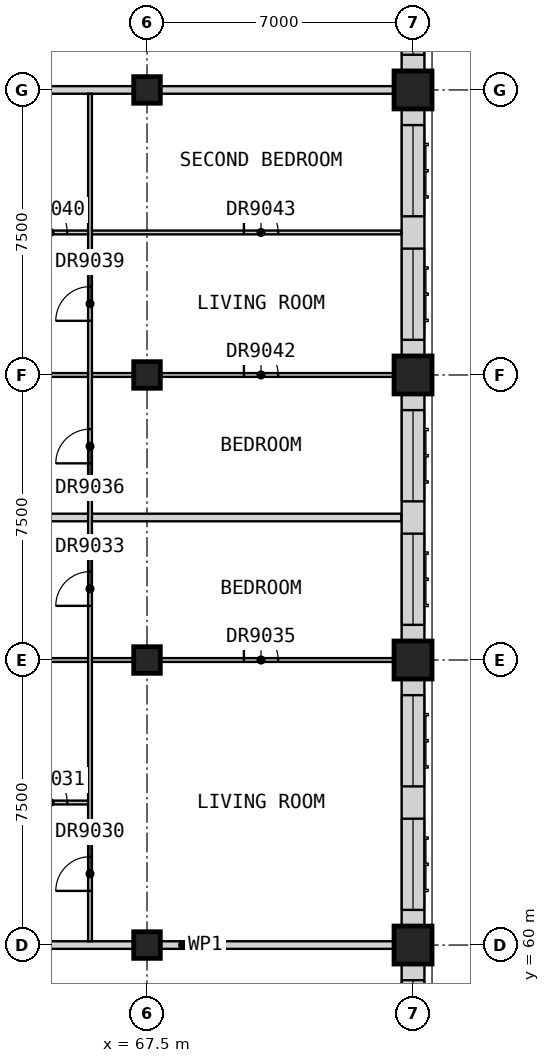
"""IFC4 building model, lengths in metres.
Left out: names, types, materials, properties, quantities, classifications, styles, units other than length and angle.
Written with IfcOpenShell. Run it as: python <this file> out.ifc"""

import sys

from ifc_helpers import new_model, si_unit, direction, frame, frame_2d, origin, origin_2d, place, context, subcontext, project, spatial, rectangle, extrude, element, fill, save


model = new_model("IFC4")
c1 = context("Model", 3, precision=1e-05, world=origin(), true_north=direction((0.0, 1.0)))
c2 = subcontext(c1, "Body", "Model", "MODEL_VIEW")
j1 = project(units=[si_unit("LENGTHUNIT", "METRE"), si_unit("PLANEANGLEUNIT", "RADIAN")], contexts=[c1])
p1 = place(None, origin())
s1 = spatial("IfcSite", under=j1, at=p1, CompositionType="ELEMENT")
p2 = place(p1, origin())
s2 = spatial("IfcBuilding", under=s1, at=p2, CompositionType="ELEMENT")
p3 = place(p2, frame((0.0, 0.0, 269.7)))
s3 = spatial("IfcBuildingStorey", under=s2, at=p3, CompositionType="ELEMENT", Elevation=269.7)
for number, where, z_axis, x_axis in (
    (1, (67.5, 60.0, 0.0), (0.0, 0.0, 1.0), (1.0, 0.0, 0.0)),
    (2, (67.5, 67.5, 0.0), (0.0, 0.0, 1.0), (1.0, 0.0, 0.0)),
    (3, (67.5, 75.0, 0.0), (0.0, 0.0, 1.0), (1.0, 0.0, 0.0)),
    (4, (67.5, 82.5, 0.0), (0.0, 0.0, 1.0), (1.0, 0.0, 0.0)),
):
    element("IfcColumn", number, at=place(p3, frame(where, z_axis=z_axis, x_axis=x_axis)), inside=s3, PredefinedType="COLUMN", context=c2, shape_type="SweptSolid", body=[
        extrude(rectangle(XDim=0.7, YDim=0.7, at=origin_2d()), origin(), (0.0, 0.0, 1.0), 3.5),
    ])
for number, where, z_axis, x_axis in (
    (5, (74.5, 60.0, 0.0), (0.0, 0.0, 1.0), (1.0, 0.0, 0.0)),
    (6, (74.5, 67.5, 0.0), (0.0, 0.0, 1.0), (1.0, 0.0, 0.0)),
    (7, (74.5, 75.0, 0.0), (0.0, 0.0, 1.0), (1.0, 0.0, 0.0)),
    (8, (74.5, 82.5, 0.0), (0.0, 0.0, 1.0), (1.0, 0.0, 0.0)),
):
    element("IfcColumn", number, at=place(p3, frame(where, z_axis=z_axis, x_axis=x_axis)), inside=s3, PredefinedType="COLUMN", context=c2, shape_type="SweptSolid", body=[
        extrude(rectangle(XDim=1.0, YDim=1.0, at=origin_2d()), origin(), (0.0, 0.0, 1.0), 3.5),
    ])
p4 = place(p3, frame((74.5, 53.0, 0.0), z_axis=(0.0, 0.0, 1.0), x_axis=(0.0, 1.0, 0.0)))
e9 = element("IfcWall", 9, at=p4, inside=s3, PredefinedType="SOLIDWALL", context=c2, shape_type="SweptSolid", body=[
    extrude(rectangle(XDim=6.5, YDim=0.6, at=frame_2d((3.25, 0.0))), origin(), (0.0, 0.0, 1.0), 2.75),
])
p5 = place(p4, frame((0.425, 0.0, 0.8)))
e10 = element("IfcOpeningElement", 10, at=p5, cuts=e9, PredefinedType="OPENING", context=c2, shape_type="SweptSolid", body=[
    extrude(rectangle(XDim=2.4, YDim=1.8, at=frame_2d((1.2, 0.9))), frame((0.0, 0.31, 0.0), z_axis=(0.0, -1.0, 0.0), x_axis=(1.0, 0.0, 0.0)), (0.0, 0.0, 1.0), 0.62),
])
p6 = place(p4, frame((3.675, 0.0, 0.8)))
e11 = element("IfcOpeningElement", 11, at=p6, cuts=e9, PredefinedType="OPENING", context=c2, shape_type="SweptSolid", body=[
    extrude(rectangle(XDim=2.4, YDim=1.8, at=frame_2d((1.2, 0.9))), frame((0.0, 0.31, 0.0), z_axis=(0.0, -1.0, 0.0), x_axis=(1.0, 0.0, 0.0)), (0.0, 0.0, 1.0), 0.62),
])
p7 = place(p3, frame((74.5, 60.5, 0.0), z_axis=(0.0, 0.0, 1.0), x_axis=(0.0, 1.0, 0.0)))
e12 = element("IfcWall", 12, at=p7, inside=s3, PredefinedType="SOLIDWALL", context=c2, shape_type="SweptSolid", body=[
    extrude(rectangle(XDim=6.5, YDim=0.6, at=frame_2d((3.25, 0.0))), origin(), (0.0, 0.0, 1.0), 2.75),
])
p8 = place(p7, frame((0.425, 0.0, 0.8)))
e13 = element("IfcOpeningElement", 13, at=p8, cuts=e12, PredefinedType="OPENING", context=c2, shape_type="SweptSolid", body=[
    extrude(rectangle(XDim=2.4, YDim=1.8, at=frame_2d((1.2, 0.9))), frame((0.0, 0.31, 0.0), z_axis=(0.0, -1.0, 0.0), x_axis=(1.0, 0.0, 0.0)), (0.0, 0.0, 1.0), 0.62),
])
p9 = place(p7, frame((3.675, 0.0, 0.8)))
e14 = element("IfcOpeningElement", 14, at=p9, cuts=e12, PredefinedType="OPENING", context=c2, shape_type="SweptSolid", body=[
    extrude(rectangle(XDim=2.4, YDim=1.8, at=frame_2d((1.2, 0.9))), frame((0.0, 0.31, 0.0), z_axis=(0.0, -1.0, 0.0), x_axis=(1.0, 0.0, 0.0)), (0.0, 0.0, 1.0), 0.62),
])
p10 = place(p3, frame((74.5, 68.0, 0.0), z_axis=(0.0, 0.0, 1.0), x_axis=(0.0, 1.0, 0.0)))
e15 = element("IfcWall", 15, at=p10, inside=s3, PredefinedType="SOLIDWALL", context=c2, shape_type="SweptSolid", body=[
    extrude(rectangle(XDim=6.5, YDim=0.6, at=frame_2d((3.25, 0.0))), origin(), (0.0, 0.0, 1.0), 2.75),
])
p11 = place(p10, frame((0.425, 0.0, 0.8)))
e16 = element("IfcOpeningElement", 16, at=p11, cuts=e15, PredefinedType="OPENING", context=c2, shape_type="SweptSolid", body=[
    extrude(rectangle(XDim=2.4, YDim=1.8, at=frame_2d((1.2, 0.9))), frame((0.0, 0.31, 0.0), z_axis=(0.0, -1.0, 0.0), x_axis=(1.0, 0.0, 0.0)), (0.0, 0.0, 1.0), 0.62),
])
p12 = place(p10, frame((3.675, 0.0, 0.8)))
e17 = element("IfcOpeningElement", 17, at=p12, cuts=e15, PredefinedType="OPENING", context=c2, shape_type="SweptSolid", body=[
    extrude(rectangle(XDim=2.4, YDim=1.8, at=frame_2d((1.2, 0.9))), frame((0.0, 0.31, 0.0), z_axis=(0.0, -1.0, 0.0), x_axis=(1.0, 0.0, 0.0)), (0.0, 0.0, 1.0), 0.62),
])
p13 = place(p3, frame((74.5, 75.5, 0.0), z_axis=(0.0, 0.0, 1.0), x_axis=(0.0, 1.0, 0.0)))
e18 = element("IfcWall", 18, at=p13, inside=s3, PredefinedType="SOLIDWALL", context=c2, shape_type="SweptSolid", body=[
    extrude(rectangle(XDim=6.5, YDim=0.6, at=frame_2d((3.25, 0.0))), origin(), (0.0, 0.0, 1.0), 2.75),
])
p14 = place(p13, frame((0.425, 0.0, 0.8)))
e19 = element("IfcOpeningElement", 19, at=p14, cuts=e18, PredefinedType="OPENING", context=c2, shape_type="SweptSolid", body=[
    extrude(rectangle(XDim=2.4, YDim=1.8, at=frame_2d((1.2, 0.9))), frame((0.0, 0.31, 0.0), z_axis=(0.0, -1.0, 0.0), x_axis=(1.0, 0.0, 0.0)), (0.0, 0.0, 1.0), 0.62),
])
p15 = place(p13, frame((3.675, 0.0, 0.8)))
e20 = element("IfcOpeningElement", 20, at=p15, cuts=e18, PredefinedType="OPENING", context=c2, shape_type="SweptSolid", body=[
    extrude(rectangle(XDim=2.4, YDim=1.8, at=frame_2d((1.2, 0.9))), frame((0.0, 0.31, 0.0), z_axis=(0.0, -1.0, 0.0), x_axis=(1.0, 0.0, 0.0)), (0.0, 0.0, 1.0), 0.62),
])
p16 = place(p3, frame((74.5, 83.0, 0.0), z_axis=(0.0, 0.0, 1.0), x_axis=(0.0, 1.0, 0.0)))
e21 = element("IfcWall", 21, at=p16, inside=s3, PredefinedType="SOLIDWALL", context=c2, shape_type="SweptSolid", body=[
    extrude(rectangle(XDim=6.5, YDim=0.6, at=frame_2d((3.25, 0.0))), origin(), (0.0, 0.0, 1.0), 2.75),
])
p17 = place(p16, frame((0.425, 0.0, 0.8)))
e22 = element("IfcOpeningElement", 22, at=p17, cuts=e21, PredefinedType="OPENING", context=c2, shape_type="SweptSolid", body=[
    extrude(rectangle(XDim=2.4, YDim=1.8, at=frame_2d((1.2, 0.9))), frame((0.0, 0.31, 0.0), z_axis=(0.0, -1.0, 0.0), x_axis=(1.0, 0.0, 0.0)), (0.0, 0.0, 1.0), 0.62),
])
p18 = place(p16, frame((3.675, 0.0, 0.8)))
e23 = element("IfcOpeningElement", 23, at=p18, cuts=e21, PredefinedType="OPENING", context=c2, shape_type="SweptSolid", body=[
    extrude(rectangle(XDim=2.4, YDim=1.8, at=frame_2d((1.2, 0.9))), frame((0.0, 0.31, 0.0), z_axis=(0.0, -1.0, 0.0), x_axis=(1.0, 0.0, 0.0)), (0.0, 0.0, 1.0), 0.62),
])
p19 = place(p3, frame((61.875, 60.0, 0.0), z_axis=(0.0, 0.0, 1.0), x_axis=(1.0, 0.0, 0.0)))
e24 = element("IfcWall", 24, at=p19, inside=s3, PredefinedType="PARTITIONING", context=c2, shape_type="SweptSolid", body=[
    extrude(rectangle(XDim=13.125, YDim=0.2, at=frame_2d((6.562, 0.0))), origin(), (0.0, 0.0, 1.0), 3.25),
])
p20 = place(p3, frame((61.875, 71.25, 0.0), z_axis=(0.0, 0.0, 1.0), x_axis=(1.0, 0.0, 0.0)))
e25 = element("IfcWall", 25, at=p20, inside=s3, PredefinedType="PARTITIONING", context=c2, shape_type="SweptSolid", body=[
    extrude(rectangle(XDim=12.315, YDim=0.2, at=frame_2d((6.157, 0.0))), origin(), (0.0, 0.0, 1.0), 3.25),
])
p21 = place(p3, frame((61.875, 82.5, 0.0), z_axis=(0.0, 0.0, 1.0), x_axis=(1.0, 0.0, 0.0)))
e26 = element("IfcWall", 26, at=p21, inside=s3, PredefinedType="PARTITIONING", context=c2, shape_type="SweptSolid", body=[
    extrude(rectangle(XDim=13.125, YDim=0.2, at=frame_2d((6.562, 0.0))), origin(), (0.0, 0.0, 1.0), 3.25),
])
p22 = place(p3, frame((63.962, 63.75, 0.0), z_axis=(0.0, 0.0, 1.0), x_axis=(1.0, 0.0, 0.0)))
e27 = element("IfcWall", 27, at=p22, inside=s3, PredefinedType="PARTITIONING", context=c2, shape_type="SweptSolid", body=[
    extrude(rectangle(XDim=1.988, YDim=0.1, at=frame_2d((0.994, 0.0))), origin(), (0.0, 0.0, 1.0), 3.25),
])
p23 = place(p22, frame((0.538, 0.0, 0.0)))
e28 = element("IfcOpeningElement", 28, at=p23, cuts=e27, PredefinedType="OPENING", context=c2, shape_type="SweptSolid", body=[
    extrude(rectangle(XDim=0.9, YDim=2.1, at=frame_2d((0.45, 1.05))), frame((0.0, 0.06, 0.0), z_axis=(0.0, -1.0, 0.0), x_axis=(1.0, 0.0, 0.0)), (0.0, 0.0, 1.0), 0.12),
])
p24 = place(p3, frame((63.962, 67.5, 0.0), z_axis=(0.0, 0.0, 1.0), x_axis=(1.0, 0.0, 0.0)))
e29 = element("IfcWall", 29, at=p24, inside=s3, PredefinedType="PARTITIONING", context=c2, shape_type="SweptSolid", body=[
    extrude(rectangle(XDim=11.038, YDim=0.1, at=frame_2d((5.519, 0.0))), origin(), (0.0, 0.0, 1.0), 3.25),
])
p25 = place(p24, frame((6.087, 0.0, 0.0)))
e30 = element("IfcOpeningElement", 30, at=p25, cuts=e29, PredefinedType="OPENING", context=c2, shape_type="SweptSolid", body=[
    extrude(rectangle(XDim=0.9, YDim=2.1, at=frame_2d((0.45, 1.05))), frame((0.0, 0.06, 0.0), z_axis=(0.0, -1.0, 0.0), x_axis=(1.0, 0.0, 0.0)), (0.0, 0.0, 1.0), 0.12),
])
p26 = place(p3, frame((63.962, 75.0, 0.0), z_axis=(0.0, 0.0, 1.0), x_axis=(1.0, 0.0, 0.0)))
e31 = element("IfcWall", 31, at=p26, inside=s3, PredefinedType="PARTITIONING", context=c2, shape_type="SweptSolid", body=[
    extrude(rectangle(XDim=11.038, YDim=0.1, at=frame_2d((5.519, 0.0))), origin(), (0.0, 0.0, 1.0), 3.25),
])
p27 = place(p26, frame((6.087, 0.0, 0.0)))
e32 = element("IfcOpeningElement", 32, at=p27, cuts=e31, PredefinedType="OPENING", context=c2, shape_type="SweptSolid", body=[
    extrude(rectangle(XDim=0.9, YDim=2.1, at=frame_2d((0.45, 1.05))), frame((0.0, 0.06, 0.0), z_axis=(0.0, -1.0, 0.0), x_axis=(1.0, 0.0, 0.0)), (0.0, 0.0, 1.0), 0.12),
])
p28 = place(p3, frame((63.962, 78.75, 0.0), z_axis=(0.0, 0.0, 1.0), x_axis=(1.0, 0.0, 0.0)))
e33 = element("IfcWall", 33, at=p28, inside=s3, PredefinedType="PARTITIONING", context=c2, shape_type="SweptSolid", body=[
    extrude(rectangle(XDim=10.228, YDim=0.1, at=frame_2d((5.114, 0.0))), origin(), (0.0, 0.0, 1.0), 3.25),
])
p29 = place(p28, frame((0.538, 0.0, 0.0)))
e34 = element("IfcOpeningElement", 34, at=p29, cuts=e33, PredefinedType="OPENING", context=c2, shape_type="SweptSolid", body=[
    extrude(rectangle(XDim=0.9, YDim=2.1, at=frame_2d((0.45, 1.05))), frame((0.0, 0.06, 0.0), z_axis=(0.0, -1.0, 0.0), x_axis=(1.0, 0.0, 0.0)), (0.0, 0.0, 1.0), 0.12),
])
p30 = place(p28, frame((6.087, 0.0, 0.0)))
e35 = element("IfcOpeningElement", 35, at=p30, cuts=e33, PredefinedType="OPENING", context=c2, shape_type="SweptSolid", body=[
    extrude(rectangle(XDim=0.9, YDim=2.1, at=frame_2d((0.45, 1.05))), frame((0.0, 0.06, 0.0), z_axis=(0.0, -1.0, 0.0), x_axis=(1.0, 0.0, 0.0)), (0.0, 0.0, 1.0), 0.12),
])
p31 = place(p3, frame((66.0, 60.1, 0.0), z_axis=(0.0, 0.0, 1.0), x_axis=(0.0, 1.0, 0.0)))
e36 = element("IfcWall", 36, at=p31, inside=s3, PredefinedType="PARTITIONING", context=c2, shape_type="SweptSolid", body=[
    extrude(rectangle(XDim=22.3, YDim=0.1, at=frame_2d((11.15, 0.0))), origin(), (0.0, 0.0, 1.0), 3.25),
])
p32 = place(p31, frame((1.325, 0.0, 0.0)))
e37 = element("IfcOpeningElement", 37, at=p32, cuts=e36, PredefinedType="OPENING", context=c2, shape_type="SweptSolid", body=[
    extrude(rectangle(XDim=0.9, YDim=2.1, at=frame_2d((0.45, 1.05))), frame((0.0, 0.06, 0.0), z_axis=(0.0, -1.0, 0.0), x_axis=(1.0, 0.0, 0.0)), (0.0, 0.0, 1.0), 0.12),
])
p33 = place(p31, frame((8.825, 0.0, 0.0)))
e38 = element("IfcOpeningElement", 38, at=p33, cuts=e36, PredefinedType="OPENING", context=c2, shape_type="SweptSolid", body=[
    extrude(rectangle(XDim=0.9, YDim=2.1, at=frame_2d((0.45, 1.05))), frame((0.0, 0.06, 0.0), z_axis=(0.0, -1.0, 0.0), x_axis=(1.0, 0.0, 0.0)), (0.0, 0.0, 1.0), 0.12),
])
p34 = place(p31, frame((12.575, 0.0, 0.0)))
e39 = element("IfcOpeningElement", 39, at=p34, cuts=e36, PredefinedType="OPENING", context=c2, shape_type="SweptSolid", body=[
    extrude(rectangle(XDim=0.9, YDim=2.1, at=frame_2d((0.45, 1.05))), frame((0.0, 0.06, 0.0), z_axis=(0.0, -1.0, 0.0), x_axis=(1.0, 0.0, 0.0)), (0.0, 0.0, 1.0), 0.12),
])
p35 = place(p31, frame((16.325, 0.0, 0.0)))
e40 = element("IfcOpeningElement", 40, at=p35, cuts=e36, PredefinedType="OPENING", context=c2, shape_type="SweptSolid", body=[
    extrude(rectangle(XDim=0.9, YDim=2.1, at=frame_2d((0.45, 1.05))), frame((0.0, 0.06, 0.0), z_axis=(0.0, -1.0, 0.0), x_axis=(1.0, 0.0, 0.0)), (0.0, 0.0, 1.0), 0.12),
])
p36 = place(p6, origin())
e41 = element("IfcWindow", 41, at=p36, inside=s3, PartitioningType="SINGLE_PANEL", PredefinedType="WINDOW", context=c2, shape_type="SweptSolid", body=[
    extrude(rectangle(XDim=2.4, YDim=1.8, at=frame_2d((1.2, 0.9))), frame((0.0, -0.07, 0.0), z_axis=(0.0, -1.0, 0.0), x_axis=(1.0, 0.0, 0.0)), (0.0, 0.0, 1.0), 0.06),
])
fill(e11, e41)
p37 = place(p8, origin())
e42 = element("IfcWindow", 42, at=p37, inside=s3, PartitioningType="SINGLE_PANEL", PredefinedType="WINDOW", context=c2, shape_type="SweptSolid", body=[
    extrude(rectangle(XDim=2.4, YDim=1.8, at=frame_2d((1.2, 0.9))), frame((0.0, -0.07, 0.0), z_axis=(0.0, -1.0, 0.0), x_axis=(1.0, 0.0, 0.0)), (0.0, 0.0, 1.0), 0.06),
])
fill(e13, e42)
p38 = place(p9, origin())
e43 = element("IfcWindow", 43, at=p38, inside=s3, PartitioningType="SINGLE_PANEL", PredefinedType="WINDOW", context=c2, shape_type="SweptSolid", body=[
    extrude(rectangle(XDim=2.4, YDim=1.8, at=frame_2d((1.2, 0.9))), frame((0.0, -0.07, 0.0), z_axis=(0.0, -1.0, 0.0), x_axis=(1.0, 0.0, 0.0)), (0.0, 0.0, 1.0), 0.06),
])
fill(e14, e43)
p39 = place(p11, origin())
e44 = element("IfcWindow", 44, at=p39, inside=s3, PartitioningType="SINGLE_PANEL", PredefinedType="WINDOW", context=c2, shape_type="SweptSolid", body=[
    extrude(rectangle(XDim=2.4, YDim=1.8, at=frame_2d((1.2, 0.9))), frame((0.0, -0.07, 0.0), z_axis=(0.0, -1.0, 0.0), x_axis=(1.0, 0.0, 0.0)), (0.0, 0.0, 1.0), 0.06),
])
fill(e16, e44)
p40 = place(p12, origin())
e45 = element("IfcWindow", 45, at=p40, inside=s3, PartitioningType="SINGLE_PANEL", PredefinedType="WINDOW", context=c2, shape_type="SweptSolid", body=[
    extrude(rectangle(XDim=2.4, YDim=1.8, at=frame_2d((1.2, 0.9))), frame((0.0, -0.07, 0.0), z_axis=(0.0, -1.0, 0.0), x_axis=(1.0, 0.0, 0.0)), (0.0, 0.0, 1.0), 0.06),
])
fill(e17, e45)
p41 = place(p14, origin())
e46 = element("IfcWindow", 46, at=p41, inside=s3, PartitioningType="SINGLE_PANEL", PredefinedType="WINDOW", context=c2, shape_type="SweptSolid", body=[
    extrude(rectangle(XDim=2.4, YDim=1.8, at=frame_2d((1.2, 0.9))), frame((0.0, -0.07, 0.0), z_axis=(0.0, -1.0, 0.0), x_axis=(1.0, 0.0, 0.0)), (0.0, 0.0, 1.0), 0.06),
])
fill(e19, e46)
p42 = place(p15, origin())
e47 = element("IfcWindow", 47, at=p42, inside=s3, PartitioningType="SINGLE_PANEL", PredefinedType="WINDOW", context=c2, shape_type="SweptSolid", body=[
    extrude(rectangle(XDim=2.4, YDim=1.8, at=frame_2d((1.2, 0.9))), frame((0.0, -0.07, 0.0), z_axis=(0.0, -1.0, 0.0), x_axis=(1.0, 0.0, 0.0)), (0.0, 0.0, 1.0), 0.06),
])
fill(e20, e47)
p43 = place(p17, origin())
e48 = element("IfcWindow", 48, at=p43, inside=s3, PartitioningType="SINGLE_PANEL", PredefinedType="WINDOW", context=c2, shape_type="SweptSolid", body=[
    extrude(rectangle(XDim=2.4, YDim=1.8, at=frame_2d((1.2, 0.9))), frame((0.0, -0.07, 0.0), z_axis=(0.0, -1.0, 0.0), x_axis=(1.0, 0.0, 0.0)), (0.0, 0.0, 1.0), 0.06),
])
fill(e22, e48)
p44 = place(p32, origin())
e49 = element("IfcDoor", 49, at=p44, inside=s3, OperationType="SINGLE_SWING_LEFT", PredefinedType="DOOR", context=c2, shape_type="SweptSolid", body=[
    extrude(rectangle(XDim=0.9, YDim=2.1, at=frame_2d((0.45, 1.05))), frame((0.0, 0.025, 0.0), z_axis=(0.0, -1.0, 0.0), x_axis=(1.0, 0.0, 0.0)), (0.0, 0.0, 1.0), 0.05),
])
fill(e37, e49)
p45 = place(p23, origin())
e50 = element("IfcDoor", 50, at=p45, inside=s3, OperationType="SINGLE_SWING_RIGHT", PredefinedType="DOOR", context=c2, shape_type="SweptSolid", body=[
    extrude(rectangle(XDim=0.9, YDim=2.1, at=frame_2d((0.45, 1.05))), frame((0.0, 0.025, 0.0), z_axis=(0.0, -1.0, 0.0), x_axis=(1.0, 0.0, 0.0)), (0.0, 0.0, 1.0), 0.05),
])
fill(e28, e50)
p46 = place(p33, origin())
e51 = element("IfcDoor", 51, at=p46, inside=s3, OperationType="SINGLE_SWING_LEFT", PredefinedType="DOOR", context=c2, shape_type="SweptSolid", body=[
    extrude(rectangle(XDim=0.9, YDim=2.1, at=frame_2d((0.45, 1.05))), frame((0.0, 0.025, 0.0), z_axis=(0.0, -1.0, 0.0), x_axis=(1.0, 0.0, 0.0)), (0.0, 0.0, 1.0), 0.05),
])
fill(e38, e51)
p47 = place(p25, origin())
e52 = element("IfcDoor", 52, at=p47, inside=s3, OperationType="SINGLE_SWING_RIGHT", PredefinedType="DOOR", context=c2, shape_type="SweptSolid", body=[
    extrude(rectangle(XDim=0.9, YDim=2.1, at=frame_2d((0.45, 1.05))), frame((0.0, 0.025, 0.0), z_axis=(0.0, -1.0, 0.0), x_axis=(1.0, 0.0, 0.0)), (0.0, 0.0, 1.0), 0.05),
])
fill(e30, e52)
p48 = place(p34, origin())
e53 = element("IfcDoor", 53, at=p48, inside=s3, OperationType="SINGLE_SWING_LEFT", PredefinedType="DOOR", context=c2, shape_type="SweptSolid", body=[
    extrude(rectangle(XDim=0.9, YDim=2.1, at=frame_2d((0.45, 1.05))), frame((0.0, 0.025, 0.0), z_axis=(0.0, -1.0, 0.0), x_axis=(1.0, 0.0, 0.0)), (0.0, 0.0, 1.0), 0.05),
])
fill(e39, e53)
p49 = place(p35, origin())
e54 = element("IfcDoor", 54, at=p49, inside=s3, OperationType="SINGLE_SWING_LEFT", PredefinedType="DOOR", context=c2, shape_type="SweptSolid", body=[
    extrude(rectangle(XDim=0.9, YDim=2.1, at=frame_2d((0.45, 1.05))), frame((0.0, 0.025, 0.0), z_axis=(0.0, -1.0, 0.0), x_axis=(1.0, 0.0, 0.0)), (0.0, 0.0, 1.0), 0.05),
])
fill(e40, e54)
p50 = place(p29, origin())
e55 = element("IfcDoor", 55, at=p50, inside=s3, OperationType="SINGLE_SWING_RIGHT", PredefinedType="DOOR", context=c2, shape_type="SweptSolid", body=[
    extrude(rectangle(XDim=0.9, YDim=2.1, at=frame_2d((0.45, 1.05))), frame((0.0, 0.025, 0.0), z_axis=(0.0, -1.0, 0.0), x_axis=(1.0, 0.0, 0.0)), (0.0, 0.0, 1.0), 0.05),
])
fill(e34, e55)
p51 = place(p27, origin())
e56 = element("IfcDoor", 56, at=p51, inside=s3, OperationType="SINGLE_SWING_RIGHT", PredefinedType="DOOR", context=c2, shape_type="SweptSolid", body=[
    extrude(rectangle(XDim=0.9, YDim=2.1, at=frame_2d((0.45, 1.05))), frame((0.0, 0.025, 0.0), z_axis=(0.0, -1.0, 0.0), x_axis=(1.0, 0.0, 0.0)), (0.0, 0.0, 1.0), 0.05),
])
fill(e32, e56)
p52 = place(p30, origin())
e57 = element("IfcDoor", 57, at=p52, inside=s3, OperationType="SINGLE_SWING_RIGHT", PredefinedType="DOOR", context=c2, shape_type="SweptSolid", body=[
    extrude(rectangle(XDim=0.9, YDim=2.1, at=frame_2d((0.45, 1.05))), frame((0.0, 0.025, 0.0), z_axis=(0.0, -1.0, 0.0), x_axis=(1.0, 0.0, 0.0)), (0.0, 0.0, 1.0), 0.05),
])
fill(e35, e57)
save(model, sys.argv[1])
